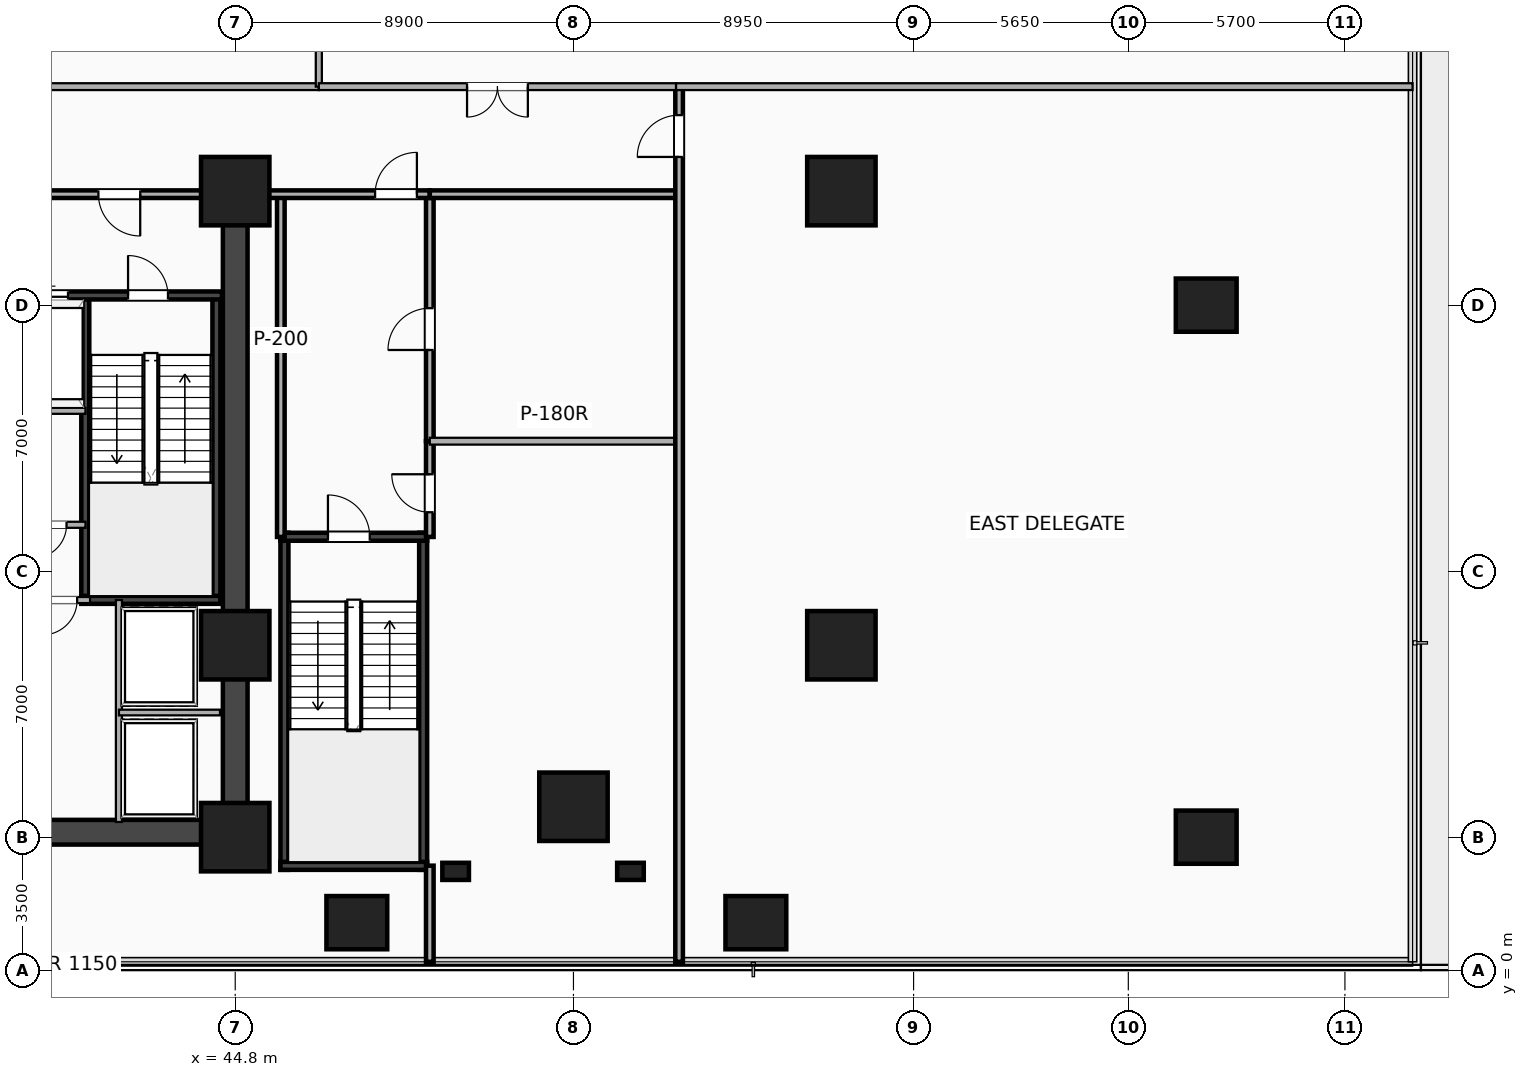
"""IFC4 building model, lengths in metres.
Left out: names, types, materials, properties, quantities, classifications, styles, units other than length and angle.
Written with IfcOpenShell. Run it as: python <this file> out.ifc"""

import sys

from ifc_helpers import new_model, si_unit, direction, frame, frame_2d, origin, origin_2d, place, context, subcontext, project, spatial, rectangle, extrude, element, fill, save


model = new_model("IFC4")
c1 = context("Model", 3, precision=1e-05, world=origin(), true_north=direction((0.0, 1.0)))
c2 = subcontext(c1, "Body", "Model", "MODEL_VIEW")
j1 = project(units=[si_unit("LENGTHUNIT", "METRE"), si_unit("PLANEANGLEUNIT", "RADIAN")], contexts=[c1])
p1 = place(None, origin())
s1 = spatial("IfcSite", under=j1, at=p1, CompositionType="ELEMENT")
p2 = place(p1, origin())
s2 = spatial("IfcBuilding", under=s1, at=p2, CompositionType="ELEMENT")
p3 = place(p2, frame((0.0, 0.0, 5.4)))
s3 = spatial("IfcBuildingStorey", under=s2, at=p3, CompositionType="ELEMENT", Elevation=5.4)
p4 = place(p3, frame((20.3, 3.63, 0.0), z_axis=(0.0, 0.0, 1.0), x_axis=(1.0, 0.0, 0.0)))
e1 = element("IfcWall", 1, at=p4, inside=s3, PredefinedType="SHEAR", context=c2, shape_type="SweptSolid", body=[
    extrude(rectangle(XDim=24.5, YDim=0.65, at=frame_2d((12.25, 0.0))), origin(), (0.0, 0.0, 1.0), 4.3),
])
p5 = place(p3, frame((44.8, 3.5, 0.0), z_axis=(0.0, 0.0, 1.0), x_axis=(0.0, 1.0, 0.0)))
e2 = element("IfcWall", 2, at=p5, inside=s3, PredefinedType="SHEAR", context=c2, shape_type="SweptSolid", body=[
    extrude(rectangle(XDim=16.9, YDim=0.65, at=frame_2d((8.45, 0.0))), origin(), (0.0, 0.0, 1.0), 4.3),
])
for number, where, z_axis, x_axis in (
    (3, (40.855, 9.745, 0.0), (0.0, 0.0, 1.0), (0.0, 1.0, 0.0)),
    (4, (44.305, 9.745, 0.0), (0.0, 0.0, 1.0), (0.0, 1.0, 0.0)),
):
    element("IfcWall", number, at=place(p3, frame(where, z_axis=z_axis, x_axis=x_axis)), inside=s3, PredefinedType="SHEAR", context=c2, shape_type="SweptSolid", body=[
        extrude(rectangle(XDim=8.01, YDim=0.21, at=frame_2d((4.005, 0.0))), origin(), (0.0, 0.0, 1.0), 4.3),
    ])
p6 = place(p3, frame((40.75, 9.745, 0.0), z_axis=(0.0, 0.0, 1.0), x_axis=(1.0, 0.0, 0.0)))
e5 = element("IfcWall", 5, at=p6, inside=s3, PredefinedType="SHEAR", context=c2, shape_type="SweptSolid", body=[
    extrude(rectangle(XDim=3.66, YDim=0.21, at=frame_2d((1.83, 0.0))), origin(), (0.0, 0.0, 1.0), 4.3),
])
p7 = place(p3, frame((37.25, 17.755, 0.0), z_axis=(0.0, 0.0, 1.0), x_axis=(1.0, 0.0, 0.0)))
e6 = element("IfcWall", 6, at=p7, inside=s3, PredefinedType="SHEAR", context=c2, shape_type="SweptSolid", body=[
    extrude(rectangle(XDim=7.2, YDim=0.21, at=frame_2d((3.6, 0.0))), origin(), (0.0, 0.0, 1.0), 4.3),
])
p8 = place(p7, frame((0.25, 0.0, 0.0)))
e7 = element("IfcOpeningElement", 7, at=p8, cuts=e6, PredefinedType="OPENING", context=c2, shape_type="SweptSolid", body=[
    extrude(rectangle(XDim=1.12, YDim=2.2, at=frame_2d((0.56, 1.1))), frame((0.0, 0.115, 0.0), z_axis=(0.0, -1.0, 0.0), x_axis=(1.0, 0.0, 0.0)), (0.0, 0.0, 1.0), 0.23),
])
p9 = place(p7, frame((2.05, 0.0, 0.0)))
e8 = element("IfcOpeningElement", 8, at=p9, cuts=e6, PredefinedType="OPENING", context=c2, shape_type="SweptSolid", body=[
    extrude(rectangle(XDim=1.1, YDim=2.18, at=frame_2d((0.55, 1.09))), frame((0.0, 0.115, 0.0), z_axis=(0.0, -1.0, 0.0), x_axis=(1.0, 0.0, 0.0)), (0.0, 0.0, 1.0), 0.23),
])
p10 = place(p7, frame((5.78, 0.0, 0.0), z_axis=(0.0, 0.0, 1.0), x_axis=(-1.0, 0.0, 0.0)))
e9 = element("IfcOpeningElement", 9, at=p10, cuts=e6, PredefinedType="OPENING", context=c2, shape_type="SweptSolid", body=[
    extrude(rectangle(XDim=1.05, YDim=2.15, at=frame_2d((0.525, 1.075))), frame((0.0, 0.115, 0.0), z_axis=(0.0, -1.0, 0.0), x_axis=(1.0, 0.0, 0.0)), (0.0, 0.0, 1.0), 0.23),
])
for number, where, z_axis, x_axis in (
    (10, (46.095, 2.64, 0.0), (0.0, 0.0, 1.0), (0.0, 1.0, 0.0)),
    (11, (49.745, 2.64, 0.0), (0.0, 0.0, 1.0), (0.0, 1.0, 0.0)),
):
    element("IfcWall", number, at=place(p3, frame(where, z_axis=z_axis, x_axis=x_axis)), inside=s3, PredefinedType="SHEAR", context=c2, shape_type="SweptSolid", body=[
        extrude(rectangle(XDim=8.87, YDim=0.21, at=frame_2d((4.435, 0.0))), origin(), (0.0, 0.0, 1.0), 4.3),
    ])
p11 = place(p3, frame((45.99, 2.745, 0.0), z_axis=(0.0, 0.0, 1.0), x_axis=(1.0, 0.0, 0.0)))
e12 = element("IfcWall", 12, at=p11, inside=s3, PredefinedType="SHEAR", context=c2, shape_type="SweptSolid", body=[
    extrude(rectangle(XDim=3.86, YDim=0.21, at=frame_2d((1.93, 0.0))), origin(), (0.0, 0.0, 1.0), 4.3),
])
p12 = place(p3, frame((45.99, 11.405, 0.0), z_axis=(0.0, 0.0, 1.0), x_axis=(1.0, 0.0, 0.0)))
e13 = element("IfcWall", 13, at=p12, inside=s3, PredefinedType="SHEAR", context=c2, shape_type="SweptSolid", body=[
    extrude(rectangle(XDim=3.86, YDim=0.21, at=frame_2d((1.93, 0.0))), origin(), (0.0, 0.0, 1.0), 4.3),
])
p13 = place(p12, frame((2.35, 0.0, 0.0), z_axis=(0.0, 0.0, 1.0), x_axis=(-1.0, 0.0, 0.0)))
e14 = element("IfcOpeningElement", 14, at=p13, cuts=e13, PredefinedType="OPENING", context=c2, shape_type="SweptSolid", body=[
    extrude(rectangle(XDim=1.1, YDim=2.15, at=frame_2d((0.55, 1.075))), frame((0.0, 0.115, 0.0), z_axis=(0.0, -1.0, 0.0), x_axis=(1.0, 0.0, 0.0)), (0.0, 0.0, 1.0), 0.23),
])
for number, where, z_axis, x_axis in (
    (15, (50.6, 2.6, -0.3), (0.0, 0.0, 1.0), (1.0, 0.0, 0.0)),
    (16, (55.2, 2.6, -0.3), (0.0, 0.0, 1.0), (1.0, 0.0, 0.0)),
):
    element("IfcColumn", number, at=place(p3, frame(where, z_axis=z_axis, x_axis=x_axis)), inside=s3, PredefinedType="PILASTER", context=c2, shape_type="SweptSolid", body=[
        extrude(rectangle(XDim=0.7, YDim=0.45, at=origin_2d()), origin(), (0.0, 0.0, 1.0), 4.6),
    ])
for number, where, z_axis, x_axis in (
    (17, (44.8, 3.5, -0.3), (0.0, 0.0, 1.0), (1.0, 0.0, 0.0)),
    (18, (44.8, 8.55, -0.3), (0.0, 0.0, 1.0), (1.0, 0.0, 0.0)),
    (19, (44.8, 20.5, -0.3), (0.0, 0.0, 1.0), (1.0, 0.0, 0.0)),
    (20, (60.75, 8.55, -0.3), (0.0, 0.0, 1.0), (1.0, 0.0, 0.0)),
    (21, (60.75, 20.5, -0.3), (0.0, 0.0, 1.0), (1.0, 0.0, 0.0)),
    (22, (53.7, 4.3, -0.3), (0.0, 0.0, 1.0), (1.0, 0.0, 0.0)),
):
    element("IfcColumn", number, at=place(p3, frame(where, z_axis=z_axis, x_axis=x_axis)), inside=s3, PredefinedType="COLUMN", context=c2, shape_type="SweptSolid", body=[
        extrude(rectangle(XDim=1.8, YDim=1.8, at=origin_2d()), origin(), (0.0, 0.0, 1.0), 4.6),
    ])
for number, where, z_axis, x_axis in (
    (23, (70.35, 3.5, -0.3), (0.0, 0.0, 1.0), (1.0, 0.0, 0.0)),
    (24, (70.35, 17.5, -0.3), (0.0, 0.0, 1.0), (1.0, 0.0, 0.0)),
    (25, (48.0, 1.25, -0.3), (0.0, 0.0, 1.0), (1.0, 0.0, 0.0)),
    (26, (58.5, 1.25, -0.3), (0.0, 0.0, 1.0), (1.0, 0.0, 0.0)),
):
    element("IfcColumn", number, at=place(p3, frame(where, z_axis=z_axis, x_axis=x_axis)), inside=s3, PredefinedType="COLUMN", context=c2, shape_type="SweptSolid", body=[
        extrude(rectangle(XDim=1.6, YDim=1.4, at=origin_2d()), origin(), (0.0, 0.0, 1.0), 4.6),
    ])
p14 = place(p3, frame((37.25, 14.72, 0.0), z_axis=(0.0, 0.0, 1.0), x_axis=(1.0, 0.0, 0.0)))
e27 = element("IfcWall", 27, at=p14, inside=s3, PredefinedType="PARTITIONING", context=c2, shape_type="SweptSolid", body=[
    extrude(rectangle(XDim=3.61, YDim=0.16, at=frame_2d((1.805, 0.0))), origin(), (0.0, 0.0, 1.0), 3.43),
])
p15 = place(p3, frame((37.0, 20.42, 0.0), z_axis=(0.0, 0.0, 1.0), x_axis=(1.0, 0.0, 0.0)))
e28 = element("IfcWall", 28, at=p15, inside=s3, PredefinedType="PARTITIONING", context=c2, shape_type="SweptSolid", body=[
    extrude(rectangle(XDim=7.45, YDim=0.2, at=frame_2d((3.725, 0.0))), origin(), (0.0, 0.0, 1.0), 3.373),
])
p16 = place(p15, frame((4.2, 0.0, 0.0)))
e29 = element("IfcOpeningElement", 29, at=p16, cuts=e28, PredefinedType="OPENING", context=c2, shape_type="SweptSolid", body=[
    extrude(rectangle(XDim=1.1, YDim=2.15, at=frame_2d((0.55, 1.075))), frame((0.0, 0.11, 0.0), z_axis=(0.0, -1.0, 0.0), x_axis=(1.0, 0.0, 0.0)), (0.0, 0.0, 1.0), 0.22),
])
p17 = place(p3, frame((38.983, 11.72, 0.0), z_axis=(0.0, 0.0, 1.0), x_axis=(1.0, 0.0, 0.0)))
e30 = element("IfcWall", 30, at=p17, inside=s3, PredefinedType="PARTITIONING", context=c2, shape_type="SweptSolid", body=[
    extrude(rectangle(XDim=1.877, YDim=0.16, at=frame_2d((0.938, 0.0))), origin(), (0.0, 0.0, 1.0), 4.3),
])
p18 = place(p17, frame((0.499, 0.0, 0.0)))
e31 = element("IfcOpeningElement", 31, at=p18, cuts=e30, PredefinedType="OPENING", context=c2, shape_type="SweptSolid", body=[
    extrude(rectangle(XDim=0.88, YDim=2.08, at=frame_2d((0.44, 1.04))), frame((0.0, 0.09, 0.0), z_axis=(0.0, -1.0, 0.0), x_axis=(1.0, 0.0, 0.0)), (0.0, 0.0, 1.0), 0.18),
])
p19 = place(p3, frame((41.74, 3.9, 0.0), z_axis=(0.0, 0.0, 1.0), x_axis=(0.0, 1.0, 0.0)))
e32 = element("IfcWall", 32, at=p19, inside=s3, PredefinedType="PARTITIONING", context=c2, shape_type="SweptSolid", body=[
    extrude(rectangle(XDim=5.84, YDim=0.16, at=frame_2d((2.92, 0.0))), origin(), (0.0, 0.0, 1.0), 3.373),
])
p20 = place(p3, frame((41.74, 6.78, 0.0), z_axis=(0.0, 0.0, 1.0), x_axis=(1.0, 0.0, 0.0)))
e33 = element("IfcWall", 33, at=p20, inside=s3, PredefinedType="PARTITIONING", context=c2, shape_type="SweptSolid", body=[
    extrude(rectangle(XDim=2.66, YDim=0.15, at=frame_2d((1.33, 0.0))), origin(), (0.0, 0.0, 1.0), 3.43),
])
p21 = place(p3, frame((39.42, 9.74, 0.0), z_axis=(0.0, 0.0, 1.0), x_axis=(1.0, 0.0, 0.0)))
e34 = element("IfcWall", 34, at=p21, inside=s3, PredefinedType="PARTITIONING", context=c2, shape_type="SweptSolid", body=[
    extrude(rectangle(XDim=1.56, YDim=0.16, at=frame_2d((0.78, 0.0))), origin(), (0.0, 0.0, 1.0), 4.3),
])
p22 = place(p21, frame((0.3, 0.0, 0.0)))
e35 = element("IfcOpeningElement", 35, at=p22, cuts=e34, PredefinedType="OPENING", context=c2, shape_type="SweptSolid", body=[
    extrude(rectangle(XDim=0.92, YDim=2.08, at=frame_2d((0.46, 1.04))), frame((0.0, 0.09, 0.0), z_axis=(0.0, -1.0, 0.0), x_axis=(1.0, 0.0, 0.0)), (0.0, 0.0, 1.0), 0.18),
])
p23 = place(p3, frame((46.0, 11.4, 0.0), z_axis=(0.0, 0.0, 1.0), x_axis=(0.0, 1.0, 0.0)))
e36 = element("IfcWall", 36, at=p23, inside=s3, PredefinedType="PARTITIONING", context=c2, shape_type="SweptSolid", body=[
    extrude(rectangle(XDim=9.02, YDim=0.2, at=frame_2d((4.51, 0.0))), origin(), (0.0, 0.0, 1.0), 3.373),
])
p24 = place(p3, frame((49.92, 11.4, 0.0), z_axis=(0.0, 0.0, 1.0), x_axis=(0.0, 1.0, 0.0)))
e37 = element("IfcWall", 37, at=p24, inside=s3, PredefinedType="PARTITIONING", context=c2, shape_type="SweptSolid", body=[
    extrude(rectangle(XDim=2.52, YDim=0.2, at=frame_2d((1.26, 0.0))), origin(), (0.0, 0.0, 1.0), 4.3),
])
p25 = place(p24, frame((1.65, 0.0, 0.0), z_axis=(0.0, 0.0, 1.0), x_axis=(-1.0, 0.0, 0.0)))
e38 = element("IfcOpeningElement", 38, at=p25, cuts=e37, PredefinedType="OPENING", context=c2, shape_type="SweptSolid", body=[
    extrude(rectangle(XDim=1.0, YDim=2.15, at=frame_2d((0.5, 1.075))), frame((0.0, 0.11, 0.0), z_axis=(0.0, -1.0, 0.0), x_axis=(1.0, 0.0, 0.0)), (0.0, 0.0, 1.0), 0.22),
])
p26 = place(p3, frame((49.92, 13.92, 0.0), z_axis=(0.0, 0.0, 1.0), x_axis=(0.0, 1.0, 0.0)))
e39 = element("IfcWall", 39, at=p26, inside=s3, PredefinedType="PARTITIONING", context=c2, shape_type="SweptSolid", body=[
    extrude(rectangle(XDim=6.5, YDim=0.2, at=frame_2d((3.25, 0.0))), origin(), (0.0, 0.0, 1.0), 3.373),
])
p27 = place(p26, frame((3.5, 0.0, 0.0), z_axis=(0.0, 0.0, 1.0), x_axis=(-1.0, 0.0, 0.0)))
e40 = element("IfcOpeningElement", 40, at=p27, cuts=e39, PredefinedType="OPENING", context=c2, shape_type="SweptSolid", body=[
    extrude(rectangle(XDim=1.1, YDim=2.15, at=frame_2d((0.55, 1.075))), frame((0.0, 0.11, 0.0), z_axis=(0.0, -1.0, 0.0), x_axis=(1.0, 0.0, 0.0)), (0.0, 0.0, 1.0), 0.22),
])
p28 = place(p3, frame((49.92, 0.22, 0.0), z_axis=(0.0, 0.0, 1.0), x_axis=(0.0, 1.0, 0.0)))
e41 = element("IfcWall", 41, at=p28, inside=s3, PredefinedType="PARTITIONING", context=c2, shape_type="SweptSolid", body=[
    extrude(rectangle(XDim=2.53, YDim=0.2, at=frame_2d((1.265, 0.0))), origin(), (0.0, 0.0, 1.0), 3.373),
])
p29 = place(p3, frame((44.8, 20.42, 0.0), z_axis=(0.0, 0.0, 1.0), x_axis=(1.0, 0.0, 0.0)))
e42 = element("IfcWall", 42, at=p29, inside=s3, PredefinedType="PARTITIONING", context=c2, shape_type="SweptSolid", body=[
    extrude(rectangle(XDim=5.12, YDim=0.2, at=frame_2d((2.56, 0.0))), origin(), (0.0, 0.0, 1.0), 3.373),
])
p30 = place(p29, frame((4.781, 0.0, 0.0), z_axis=(0.0, 0.0, 1.0), x_axis=(-1.0, 0.0, 0.0)))
e43 = element("IfcOpeningElement", 43, at=p30, cuts=e42, PredefinedType="OPENING", context=c2, shape_type="SweptSolid", body=[
    extrude(rectangle(XDim=1.1, YDim=2.15, at=frame_2d((0.55, 1.075))), frame((0.0, 0.11, 0.0), z_axis=(0.0, -1.0, 0.0), x_axis=(1.0, 0.0, 0.0)), (0.0, 0.0, 1.0), 0.22),
])
p31 = place(p3, frame((49.92, 20.42, 0.0), z_axis=(0.0, 0.0, 1.0), x_axis=(1.0, 0.0, 0.0)))
e44 = element("IfcWall", 44, at=p31, inside=s3, PredefinedType="PARTITIONING", context=c2, shape_type="SweptSolid", body=[
    extrude(rectangle(XDim=6.56, YDim=0.2, at=frame_2d((3.28, 0.0))), origin(), (0.0, 0.0, 1.0), 3.373),
])
p32 = place(p3, frame((49.92, 13.92, 0.0), z_axis=(0.0, 0.0, 1.0), x_axis=(1.0, 0.0, 0.0)))
e45 = element("IfcWall", 45, at=p32, inside=s3, PredefinedType="PARTITIONING", context=c2, shape_type="SweptSolid", body=[
    extrude(rectangle(XDim=6.56, YDim=0.18, at=frame_2d((3.28, 0.0))), origin(), (0.0, 0.0, 1.0), 4.3),
])
p33 = place(p3, frame((56.48, 0.22, 0.0), z_axis=(0.0, 0.0, 1.0), x_axis=(0.0, 1.0, 0.0)))
e46 = element("IfcWall", 46, at=p33, inside=s3, PredefinedType="PARTITIONING", context=c2, shape_type="SweptSolid", body=[
    extrude(rectangle(XDim=23.03, YDim=0.2, at=frame_2d((11.515, 0.0))), origin(), (0.0, 0.0, 1.0), 3.373),
])
p34 = place(p33, frame((22.28, 0.0, 0.0), z_axis=(0.0, 0.0, 1.0), x_axis=(-1.0, 0.0, 0.0)))
e47 = element("IfcOpeningElement", 47, at=p34, cuts=e46, PredefinedType="OPENING", context=c2, shape_type="SweptSolid", body=[
    extrude(rectangle(XDim=1.1, YDim=2.15, at=frame_2d((0.55, 1.075))), frame((0.0, 0.11, 0.0), z_axis=(0.0, -1.0, 0.0), x_axis=(1.0, 0.0, 0.0)), (0.0, 0.0, 1.0), 0.22),
])
p35 = place(p3, frame((24.5, 23.25, 0.0), z_axis=(0.0, 0.0, 1.0), x_axis=(1.0, 0.0, 0.0)))
e48 = element("IfcWall", 48, at=p35, inside=s3, PredefinedType="PARTITIONING", context=c2, shape_type="SweptSolid", body=[
    extrude(rectangle(XDim=22.5, YDim=0.18, at=frame_2d((11.25, 0.0))), origin(), (0.0, 0.0, 1.0), 3.43),
])
p36 = place(p35, frame((10.45, 0.0, 0.0)))
e49 = element("IfcOpeningElement", 49, at=p36, cuts=e48, PredefinedType="OPENING", context=c2, shape_type="SweptSolid", body=[
    extrude(rectangle(XDim=1.6, YDim=2.22, at=frame_2d((0.8, 1.11))), frame((0.0, 0.1, 0.0), z_axis=(0.0, -1.0, 0.0), x_axis=(1.0, 0.0, 0.0)), (0.0, 0.0, 1.0), 0.2),
])
p37 = place(p3, frame((47.0, 23.25, 0.0), z_axis=(0.0, 0.0, 1.0), x_axis=(0.0, 1.0, 0.0)))
e50 = element("IfcWall", 50, at=p37, inside=s3, PredefinedType="PARTITIONING", context=c2, shape_type="SweptSolid", body=[
    extrude(rectangle(XDim=27.3, YDim=0.16, at=frame_2d((13.65, 0.0))), origin(), (0.0, 0.0, 1.0), 3.373),
])
p38 = place(p3, frame((47.0, 23.25, 0.0), z_axis=(0.0, 0.0, 1.0), x_axis=(1.0, 0.0, 0.0)))
e51 = element("IfcWall", 51, at=p38, inside=s3, PredefinedType="PARTITIONING", context=c2, shape_type="SweptSolid", body=[
    extrude(rectangle(XDim=9.4, YDim=0.18, at=frame_2d((4.7, 0.0))), origin(), (0.0, 0.0, 1.0), 3.982),
])
p39 = place(p38, frame((3.9, 0.0, 0.0)))
e52 = element("IfcOpeningElement", 52, at=p39, cuts=e51, PredefinedType="OPENING", context=c2, shape_type="SweptSolid", body=[
    extrude(rectangle(XDim=1.6, YDim=2.22, at=frame_2d((0.8, 1.11))), frame((0.0, 0.1, 0.0), z_axis=(0.0, -1.0, 0.0), x_axis=(1.0, 0.0, 0.0)), (0.0, 0.0, 1.0), 0.2),
])
p40 = place(p3, frame((56.4, 23.25, 0.0), z_axis=(0.0, 0.0, 1.0), x_axis=(1.0, 0.0, 0.0)))
e53 = element("IfcWall", 53, at=p40, inside=s3, PredefinedType="PARTITIONING", context=c2, shape_type="SweptSolid", body=[
    extrude(rectangle(XDim=19.38, YDim=0.18, at=frame_2d((9.69, 0.0))), origin(), (0.0, 0.0, 1.0), 3.43),
])
p41 = place(p9, origin())
e54 = element("IfcDoor", 54, at=p41, inside=s3, OperationType="DOUBLE_DOOR_SLIDING", PredefinedType="DOOR", context=c2, shape_type="SweptSolid", body=[
    extrude(rectangle(XDim=1.1, YDim=2.18, at=frame_2d((0.55, 1.09))), frame((0.0, 0.025, 0.0), z_axis=(0.0, -1.0, 0.0), x_axis=(1.0, 0.0, 0.0)), (0.0, 0.0, 1.0), 0.05),
])
fill(e8, e54)
p42 = place(p10, origin())
e55 = element("IfcDoor", 55, at=p42, inside=s3, OperationType="SINGLE_SWING_LEFT", PredefinedType="DOOR", context=c2, shape_type="SweptSolid", body=[
    extrude(rectangle(XDim=1.05, YDim=2.15, at=frame_2d((0.525, 1.075))), frame((0.0, 0.025, 0.0), z_axis=(0.0, -1.0, 0.0), x_axis=(1.0, 0.0, 0.0)), (0.0, 0.0, 1.0), 0.05),
])
fill(e9, e55)
p43 = place(p13, origin())
e56 = element("IfcDoor", 56, at=p43, inside=s3, OperationType="SINGLE_SWING_LEFT", PredefinedType="DOOR", context=c2, shape_type="SweptSolid", body=[
    extrude(rectangle(XDim=1.1, YDim=2.15, at=frame_2d((0.55, 1.075))), frame((0.0, 0.025, 0.0), z_axis=(0.0, -1.0, 0.0), x_axis=(1.0, 0.0, 0.0)), (0.0, 0.0, 1.0), 0.05),
])
fill(e14, e56)
p44 = place(p16, origin())
e57 = element("IfcDoor", 57, at=p44, inside=s3, OperationType="SINGLE_SWING_RIGHT", PredefinedType="DOOR", context=c2, shape_type="SweptSolid", body=[
    extrude(rectangle(XDim=1.1, YDim=2.15, at=frame_2d((0.55, 1.075))), frame((0.0, 0.025, 0.0), z_axis=(0.0, -1.0, 0.0), x_axis=(1.0, 0.0, 0.0)), (0.0, 0.0, 1.0), 0.05),
])
fill(e29, e57)
p45 = place(p18, origin())
e58 = element("IfcDoor", 58, at=p45, inside=s3, OperationType="SINGLE_SWING_LEFT", PredefinedType="DOOR", context=c2, shape_type="SweptSolid", body=[
    extrude(rectangle(XDim=0.88, YDim=2.08, at=frame_2d((0.44, 1.04))), frame((0.0, 0.025, 0.0), z_axis=(0.0, -1.0, 0.0), x_axis=(1.0, 0.0, 0.0)), (0.0, 0.0, 1.0), 0.05),
])
fill(e31, e58)
p46 = place(p22, origin())
e59 = element("IfcDoor", 59, at=p46, inside=s3, OperationType="SINGLE_SWING_LEFT", PredefinedType="DOOR", context=c2, shape_type="SweptSolid", body=[
    extrude(rectangle(XDim=0.92, YDim=2.08, at=frame_2d((0.46, 1.04))), frame((0.0, 0.025, 0.0), z_axis=(0.0, -1.0, 0.0), x_axis=(1.0, 0.0, 0.0)), (0.0, 0.0, 1.0), 0.05),
])
fill(e35, e59)
p47 = place(p25, origin())
e60 = element("IfcDoor", 60, at=p47, inside=s3, OperationType="SINGLE_SWING_RIGHT", PredefinedType="DOOR", context=c2, shape_type="SweptSolid", body=[
    extrude(rectangle(XDim=1.0, YDim=2.15, at=frame_2d((0.5, 1.075))), frame((0.0, 0.025, 0.0), z_axis=(0.0, -1.0, 0.0), x_axis=(1.0, 0.0, 0.0)), (0.0, 0.0, 1.0), 0.05),
])
fill(e38, e60)
p48 = place(p27, origin())
e61 = element("IfcDoor", 61, at=p48, inside=s3, OperationType="SINGLE_SWING_LEFT", PredefinedType="DOOR", context=c2, shape_type="SweptSolid", body=[
    extrude(rectangle(XDim=1.1, YDim=2.15, at=frame_2d((0.55, 1.075))), frame((0.0, 0.025, 0.0), z_axis=(0.0, -1.0, 0.0), x_axis=(1.0, 0.0, 0.0)), (0.0, 0.0, 1.0), 0.05),
])
fill(e40, e61)
p49 = place(p30, origin())
e62 = element("IfcDoor", 62, at=p49, inside=s3, OperationType="SINGLE_SWING_RIGHT", PredefinedType="DOOR", context=c2, shape_type="SweptSolid", body=[
    extrude(rectangle(XDim=1.1, YDim=2.15, at=frame_2d((0.55, 1.075))), frame((0.0, 0.025, 0.0), z_axis=(0.0, -1.0, 0.0), x_axis=(1.0, 0.0, 0.0)), (0.0, 0.0, 1.0), 0.05),
])
fill(e43, e62)
p50 = place(p34, origin())
e63 = element("IfcDoor", 63, at=p50, inside=s3, OperationType="SINGLE_SWING_LEFT", PredefinedType="DOOR", context=c2, shape_type="SweptSolid", body=[
    extrude(rectangle(XDim=1.1, YDim=2.15, at=frame_2d((0.55, 1.075))), frame((0.0, 0.025, 0.0), z_axis=(0.0, -1.0, 0.0), x_axis=(1.0, 0.0, 0.0)), (0.0, 0.0, 1.0), 0.05),
])
fill(e47, e63)
p51 = place(p39, origin())
e64 = element("IfcDoor", 64, at=p51, inside=s3, OperationType="DOUBLE_DOOR_SINGLE_SWING", PredefinedType="DOOR", context=c2, shape_type="SweptSolid", body=[
    extrude(rectangle(XDim=1.6, YDim=2.22, at=frame_2d((0.8, 1.11))), frame((0.0, 0.025, 0.0), z_axis=(0.0, -1.0, 0.0), x_axis=(1.0, 0.0, 0.0)), (0.0, 0.0, 1.0), 0.05),
])
fill(e52, e64)
save(model, sys.argv[1])
